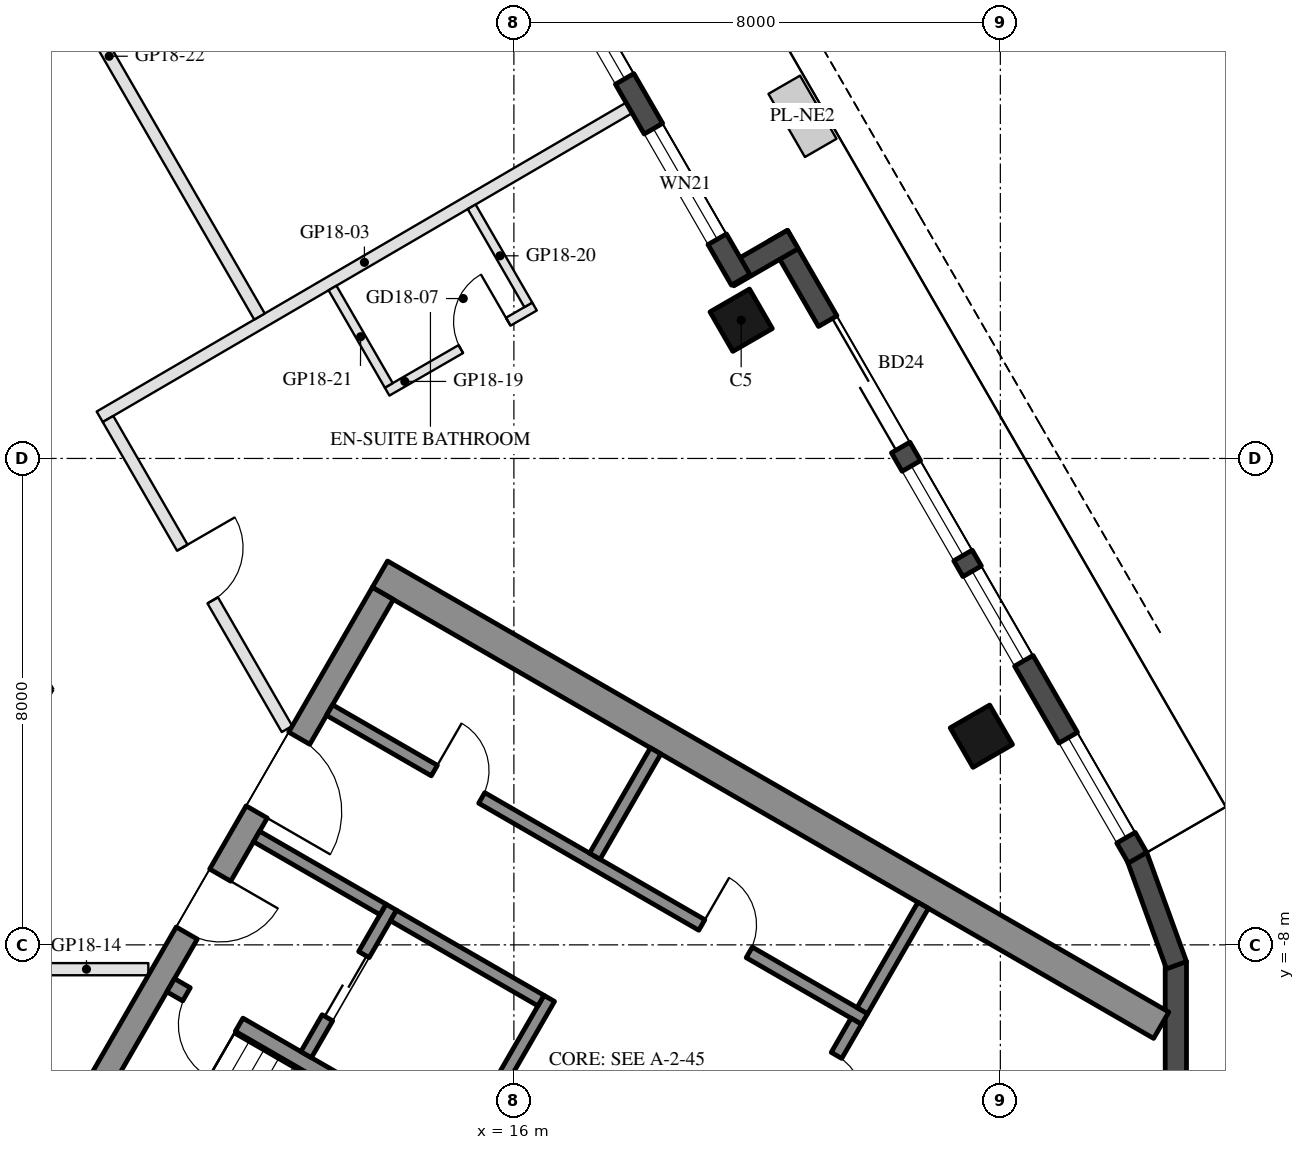
"""IFC4 building model, lengths in metres.
Left out: names, types, materials, properties, quantities, classifications, styles, units other than length and angle.
Written with IfcOpenShell. Run it as: python <this file> out.ifc"""

import sys

from ifc_helpers import new_model, si_unit, direction, frame, frame_2d, origin, origin_2d, place, context, subcontext, project, spatial, rectangle, hollow_rectangle, extrude, element, fill, save


model = new_model("IFC4")
c1 = context("Model", 3, precision=1e-05, world=origin(), true_north=direction((0.0, 1.0)))
c2 = subcontext(c1, "Body", "Model", "MODEL_VIEW")
j1 = project(units=[si_unit("LENGTHUNIT", "METRE"), si_unit("PLANEANGLEUNIT", "RADIAN")], contexts=[c1])
p1 = place(None, origin())
s1 = spatial("IfcSite", under=j1, at=p1, CompositionType="ELEMENT")
p2 = place(p1, origin())
s2 = spatial("IfcBuilding", under=s1, at=p2, CompositionType="ELEMENT")
p3 = place(p2, frame((0.0, 0.0, 198.4)))
s3 = spatial("IfcBuildingStorey", under=s2, at=p3, CompositionType="ELEMENT", Elevation=198.4)
for number, where, z_axis, x_axis in (
    (1, (23.688, -4.568, 0.0), (0.0, 0.0, 1.0), (-0.5, 0.866, 0.0)),
    (2, (19.738, 2.273, 0.0), (0.0, 0.0, 1.0), (-0.5, 0.866, 0.0)),
):
    element("IfcColumn", number, at=place(p3, frame(where, z_axis=z_axis, x_axis=x_axis)), inside=s3, PredefinedType="COLUMN", context=c2, shape_type="SweptSolid", body=[
        extrude(hollow_rectangle(XDim=0.75, YDim=0.75, WallThickness=0.035, at=origin_2d()), origin(), (0.0, 0.0, 1.0), 3.7),
    ])
for number, where, z_axis, x_axis in (
    (3, (26.244, -11.92, 0.0), (0.0, 0.0, 1.0), (0.342, 0.94, 0.0)),
    (4, (26.886, -10.185, 0.0), (0.0, 0.0, 1.0), (0.0, 1.0, 0.0)),
    (5, (26.897, -8.335, 0.0), (0.0, 0.0, 1.0), (-0.342, 0.94, 0.0)),
):
    element("IfcWall", number, at=place(p3, frame(where, z_axis=z_axis, x_axis=x_axis)), inside=s3, PredefinedType="SOLIDWALL", context=c2, shape_type="SweptSolid", body=[
        extrude(rectangle(XDim=1.91, YDim=0.35, at=frame_2d((0.955, 0.0))), origin(), (0.0, 0.0, 1.0), 3.55),
    ])
p4 = place(p3, frame((26.257, -6.567, 0.0), z_axis=(0.0, 0.0, 1.0), x_axis=(-0.500023526245, 0.866011820475, 0.0)))
e6 = element("IfcWall", 6, at=p4, inside=s3, PredefinedType="SOLIDWALL", context=c2, shape_type="SweptSolid", body=[
    extrude(rectangle(XDim=11.816, YDim=0.35, at=frame_2d((5.908, 0.0))), origin(), (0.0, 0.0, 1.0), 3.55),
])
p5 = place(p4, frame((0.38, 0.0, 0.3)))
e7 = element("IfcOpeningElement", 7, at=p5, cuts=e6, PredefinedType="OPENING", context=c2, shape_type="SweptSolid", body=[
    extrude(rectangle(XDim=1.9, YDim=2.65, at=frame_2d((0.95, 1.325))), frame((0.0, 0.185, 0.0), z_axis=(0.0, -1.0, 0.0), x_axis=(1.0, 0.0, 0.0)), (0.0, 0.0, 1.0), 0.37),
])
p6 = place(p4, frame((7.791, 0.0, 0.0)))
e8 = element("IfcOpeningElement", 8, at=p6, cuts=e6, PredefinedType="OPENING", context=c2, shape_type="SweptSolid", body=[
    extrude(rectangle(XDim=2.4, YDim=2.4, at=frame_2d((1.2, 1.2))), frame((0.0, 0.185, 0.0), z_axis=(0.0, -1.0, 0.0), x_axis=(1.0, 0.0, 0.0)), (0.0, 0.0, 1.0), 0.37),
])
p7 = place(p4, frame((3.741, 0.0, 0.3)))
e9 = element("IfcOpeningElement", 9, at=p7, cuts=e6, PredefinedType="OPENING", context=c2, shape_type="SweptSolid", body=[
    extrude(rectangle(XDim=1.7, YDim=2.65, at=frame_2d((0.85, 1.325))), frame((0.0, 0.185, 0.0), z_axis=(0.0, -1.0, 0.0), x_axis=(1.0, 0.0, 0.0)), (0.0, 0.0, 1.0), 0.37),
])
p8 = place(p4, frame((5.741, 0.0, 0.3)))
e10 = element("IfcOpeningElement", 10, at=p8, cuts=e6, PredefinedType="OPENING", context=c2, shape_type="SweptSolid", body=[
    extrude(rectangle(XDim=1.7, YDim=2.65, at=frame_2d((0.85, 1.325))), frame((0.0, 0.185, 0.0), z_axis=(0.0, -1.0, 0.0), x_axis=(1.0, 0.0, 0.0)), (0.0, 0.0, 1.0), 0.37),
])
p9 = place(p3, frame((20.588, 3.601, 0.0), z_axis=(0.0, 0.0, 1.0), x_axis=(-0.866005645448, -0.500034220881, 0.0)))
e11 = element("IfcWall", 11, at=p9, inside=s3, PredefinedType="SOLIDWALL", context=c2, shape_type="SweptSolid", body=[
    extrude(rectangle(XDim=1.22, YDim=0.35, at=frame_2d((0.61, 0.0))), origin(), (0.0, 0.0, 1.0), 3.55),
])
p10 = place(p3, frame((19.729, 2.938, 0.0), z_axis=(0.0, 0.0, 1.0), x_axis=(-0.499976430342, 0.866039011305, 0.0)))
e12 = element("IfcWall", 12, at=p10, inside=s3, PredefinedType="SOLIDWALL", context=c2, shape_type="SweptSolid", body=[
    extrude(rectangle(XDim=6.74, YDim=0.35, at=frame_2d((3.37, 0.0))), origin(), (0.0, 0.0, 1.0), 3.55),
])
p11 = place(p10, frame((0.77, 0.0, 0.3)))
e13 = element("IfcOpeningElement", 13, at=p11, cuts=e12, PredefinedType="OPENING", context=c2, shape_type="SweptSolid", body=[
    extrude(rectangle(XDim=2.1, YDim=2.65, at=frame_2d((1.05, 1.325))), frame((0.0, 0.185, 0.0), z_axis=(0.0, -1.0, 0.0), x_axis=(1.0, 0.0, 0.0)), (0.0, 0.0, 1.0), 0.37),
])
p12 = place(p10, frame((3.815, 0.0, 0.3)))
e14 = element("IfcOpeningElement", 14, at=p12, cuts=e12, PredefinedType="OPENING", context=c2, shape_type="SweptSolid", body=[
    extrude(rectangle(XDim=2.1, YDim=2.65, at=frame_2d((1.05, 1.325))), frame((0.0, 0.185, 0.0), z_axis=(0.0, -1.0, 0.0), x_axis=(1.0, 0.0, 0.0)), (0.0, 0.0, 1.0), 0.37),
])
p13 = place(p3, frame((13.797, -1.903, 0.0), z_axis=(0.0, 0.0, 1.0), x_axis=(0.866025009528, -0.500000682871, 0.0)))
e15 = element("IfcWall", 15, at=p13, inside=s3, PredefinedType="SHEAR", context=c2, shape_type="SweptSolid", body=[
    extrude(rectangle(XDim=14.837, YDim=0.5, at=frame_2d((7.418, 0.0))), origin(), (0.0, 0.0, 1.0), 3.5),
])
p14 = place(p3, frame((8.845, -10.88, 0.0), z_axis=(0.0, 0.0, 1.0), x_axis=(0.500004234368, 0.866022959057, 0.0)))
e16 = element("IfcWall", 16, at=p14, inside=s3, PredefinedType="SHEAR", context=c2, shape_type="SweptSolid", body=[
    extrude(rectangle(XDim=10.0, YDim=0.4, at=frame_2d((5.0, 0.0))), origin(), (0.0, 0.0, 1.0), 3.5),
])
p15 = place(p14, frame((3.55, 0.0, 0.0)))
e17 = element("IfcOpeningElement", 17, at=p15, cuts=e16, PredefinedType="OPENING", context=c2, shape_type="SweptSolid", body=[
    extrude(rectangle(XDim=1.1, YDim=2.1, at=frame_2d((0.55, 1.05))), frame((0.0, 0.21, 0.0), z_axis=(0.0, -1.0, 0.0), x_axis=(1.0, 0.0, 0.0)), (0.0, 0.0, 1.0), 0.42),
])
p16 = place(p14, frame((5.85, 0.0, 0.0)))
e18 = element("IfcOpeningElement", 18, at=p16, cuts=e16, PredefinedType="OPENING", context=c2, shape_type="SweptSolid", body=[
    extrude(rectangle(XDim=1.4, YDim=2.1, at=frame_2d((0.7, 1.05))), frame((0.0, 0.21, 0.0), z_axis=(0.0, -1.0, 0.0), x_axis=(1.0, 0.0, 0.0)), (0.0, 0.0, 1.0), 0.42),
])
p17 = place(p3, frame((10.356, -8.664, 0.0), z_axis=(0.0, 0.0, 1.0), x_axis=(0.866028629588, -0.499994412703, 0.0)))
e19 = element("IfcWall", 19, at=p17, inside=s3, PredefinedType="SHEAR", context=c2, shape_type="SweptSolid", body=[
    extrude(rectangle(XDim=6.45, YDim=0.25, at=frame_2d((3.225, 0.0))), origin(), (0.0, 0.0, 1.0), 3.5),
])
p18 = place(p17, frame((0.3, 0.0, 0.0)))
e20 = element("IfcOpeningElement", 20, at=p18, cuts=e19, PredefinedType="OPENING", context=c2, shape_type="SweptSolid", body=[
    extrude(rectangle(XDim=1.0, YDim=2.1, at=frame_2d((0.5, 1.05))), frame((0.0, 0.135, 0.0), z_axis=(0.0, -1.0, 0.0), x_axis=(1.0, 0.0, 0.0)), (0.0, 0.0, 1.0), 0.27),
])
p19 = place(p3, frame((15.181, -11.305, 0.0), z_axis=(0.0, 0.0, 1.0), x_axis=(0.49994636267, 0.866056369097, 0.0)))
e21 = element("IfcWall", 21, at=p19, inside=s3, PredefinedType="SHEAR", context=c2, shape_type="SweptSolid", body=[
    extrude(rectangle(XDim=2.8, YDim=0.2, at=frame_2d((1.4, 0.0))), origin(), (0.0, 0.0, 1.0), 3.5),
])
p20 = place(p3, frame((12.583, -9.805, 0.0), z_axis=(0.0, 0.0, 1.0), x_axis=(0.49994636267, 0.866056369097, 0.0)))
e22 = element("IfcWall", 22, at=p20, inside=s3, PredefinedType="SHEAR", context=c2, shape_type="SweptSolid", body=[
    extrude(rectangle(XDim=2.8, YDim=0.2, at=frame_2d((1.4, 0.0))), origin(), (0.0, 0.0, 1.0), 3.5),
])
p21 = place(p20, frame((0.7, 0.0, 0.0)))
e23 = element("IfcOpeningElement", 23, at=p21, cuts=e22, PredefinedType="OPENING", context=c2, shape_type="SweptSolid", body=[
    extrude(rectangle(XDim=1.2, YDim=2.1, at=frame_2d((0.6, 1.05))), frame((0.0, 0.11, 0.0), z_axis=(0.0, -1.0, 0.0), x_axis=(1.0, 0.0, 0.0)), (0.0, 0.0, 1.0), 0.22),
])
p22 = place(p3, frame((11.768, -6.217, 0.0), z_axis=(0.0, 0.0, 1.0), x_axis=(0.866050077142, -0.499957262057, 0.0)))
e24 = element("IfcWall", 24, at=p22, inside=s3, PredefinedType="SHEAR", context=c2, shape_type="SweptSolid", body=[
    extrude(rectangle(XDim=2.4, YDim=0.2, at=frame_2d((1.2, 0.0))), origin(), (0.0, 0.0, 1.0), 3.5),
])
p23 = place(p3, frame((14.02, -7.517, 0.0), z_axis=(0.0, 0.0, 1.0), x_axis=(0.866034573852, -0.49998411664, 0.0)))
e25 = element("IfcWall", 25, at=p23, inside=s3, PredefinedType="SHEAR", context=c2, shape_type="SweptSolid", body=[
    extrude(rectangle(XDim=2.8, YDim=0.2, at=frame_2d((1.4, 0.0))), origin(), (0.0, 0.0, 1.0), 3.5),
])
p24 = place(p3, frame((12.968, -4.138, 0.0), z_axis=(0.0, 0.0, 1.0), x_axis=(0.866028328073, -0.49999493495, 0.0)))
e26 = element("IfcWall", 26, at=p24, inside=s3, PredefinedType="SHEAR", context=c2, shape_type="SweptSolid", body=[
    extrude(rectangle(XDim=10.16, YDim=0.2, at=frame_2d((5.08, 0.0))), origin(), (0.0, 0.0, 1.0), 3.5),
])
p25 = place(p24, frame((1.99, 0.0, 0.0)))
e27 = element("IfcOpeningElement", 27, at=p25, cuts=e26, PredefinedType="OPENING", context=c2, shape_type="SweptSolid", body=[
    extrude(rectangle(XDim=0.9, YDim=2.1, at=frame_2d((0.45, 1.05))), frame((0.0, 0.11, 0.0), z_axis=(0.0, -1.0, 0.0), x_axis=(1.0, 0.0, 0.0)), (0.0, 0.0, 1.0), 0.22),
])
p26 = place(p24, frame((7.07, 0.0, 0.0)))
e28 = element("IfcOpeningElement", 28, at=p26, cuts=e26, PredefinedType="OPENING", context=c2, shape_type="SweptSolid", body=[
    extrude(rectangle(XDim=0.9, YDim=2.1, at=frame_2d((0.45, 1.05))), frame((0.0, 0.11, 0.0), z_axis=(0.0, -1.0, 0.0), x_axis=(1.0, 0.0, 0.0)), (0.0, 0.0, 1.0), 0.22),
])
p27 = place(p3, frame((20.43, -11.333, 0.0), z_axis=(0.0, 0.0, 1.0), x_axis=(0.500001309137, 0.866024647952, 0.0)))
e29 = element("IfcWall", 29, at=p27, inside=s3, PredefinedType="SHEAR", context=c2, shape_type="SweptSolid", body=[
    extrude(rectangle(XDim=2.4, YDim=0.2, at=frame_2d((1.2, 0.0))), origin(), (0.0, 0.0, 1.0), 3.5),
])
p28 = place(p27, frame((0.85, 0.0, 0.0)))
e30 = element("IfcOpeningElement", 30, at=p28, cuts=e29, PredefinedType="OPENING", context=c2, shape_type="SweptSolid", body=[
    extrude(rectangle(XDim=0.9, YDim=2.1, at=frame_2d((0.45, 1.05))), frame((0.0, 0.11, 0.0), z_axis=(0.0, -1.0, 0.0), x_axis=(1.0, 0.0, 0.0)), (0.0, 0.0, 1.0), 0.22),
])
for number, where, z_axis, x_axis in (
    (31, (17.331, -6.542, 0.0), (0.0, 0.0, 1.0), (0.5, 0.866, 0.0)),
    (32, (21.73, -9.082, 0.0), (0.0, 0.0, 1.0), (0.5, 0.866, 0.0)),
):
    element("IfcWall", number, at=place(p3, frame(where, z_axis=z_axis, x_axis=x_axis)), inside=s3, PredefinedType="SHEAR", context=c2, shape_type="SweptSolid", body=[
        extrude(rectangle(XDim=2.0, YDim=0.2, at=frame_2d((1.0, 0.0))), origin(), (0.0, 0.0, 1.0), 3.5),
    ])
p29 = place(p3, frame((17.895, 5.766, 0.0), z_axis=(0.0, 0.0, 1.0), x_axis=(-0.863697195261, -0.504011066246, 0.0)))
e33 = element("IfcWall", 33, at=p29, inside=s3, PredefinedType="PARTITIONING", context=c2, shape_type="SweptSolid", body=[
    extrude(rectangle(XDim=10.08, YDim=0.2, at=frame_2d((5.04, 0.0))), origin(), (0.0, 0.0, 1.0), 2.95),
])
p30 = place(p3, frame((9.988, -8.4, 0.0), z_axis=(0.0, 0.0, 1.0), x_axis=(-1.0, 0.0, 0.0)))
e34 = element("IfcWall", 34, at=p30, inside=s3, PredefinedType="PARTITIONING", context=c2, shape_type="SweptSolid", body=[
    extrude(rectangle(XDim=5.088, YDim=0.2, at=frame_2d((2.544, 0.0))), origin(), (0.0, 0.0, 1.0), 2.95),
])
p31 = place(p30, frame((2.044, 0.0, 0.0)))
e35 = element("IfcOpeningElement", 35, at=p31, cuts=e34, PredefinedType="OPENING", context=c2, shape_type="SweptSolid", body=[
    extrude(rectangle(XDim=1.0, YDim=2.1, at=frame_2d((0.5, 1.05))), frame((0.0, 0.11, 0.0), z_axis=(0.0, -1.0, 0.0), x_axis=(1.0, 0.0, 0.0)), (0.0, 0.0, 1.0), 0.22),
])
p32 = place(p3, frame((9.325, 0.649, 0.0), z_axis=(0.0, 0.0, 1.0), x_axis=(0.500032331163, -0.866006736574, 0.0)))
e36 = element("IfcWall", 36, at=p32, inside=s3, PredefinedType="PARTITIONING", context=c2, shape_type="SweptSolid", body=[
    extrude(rectangle(XDim=5.888, YDim=0.2, at=frame_2d((2.944, 0.0))), origin(), (0.0, 0.0, 1.0), 2.95),
])
p33 = place(p32, frame((2.444, 0.0, 0.0)))
e37 = element("IfcOpeningElement", 37, at=p33, cuts=e36, PredefinedType="OPENING", context=c2, shape_type="SweptSolid", body=[
    extrude(rectangle(XDim=1.0, YDim=2.1, at=frame_2d((0.5, 1.05))), frame((0.0, 0.11, 0.0), z_axis=(0.0, -1.0, 0.0), x_axis=(1.0, 0.0, 0.0)), (0.0, 0.0, 1.0), 0.22),
])
p34 = place(p3, frame((13.915, 1.099, 0.0), z_axis=(0.0, 0.0, 1.0), x_axis=(0.866018616679, 0.500011755427, 0.0)))
e38 = element("IfcWall", 38, at=p34, inside=s3, PredefinedType="PARTITIONING", context=c2, shape_type="SweptSolid", body=[
    extrude(rectangle(XDim=2.8, YDim=0.15, at=frame_2d((1.4, 0.0))), origin(), (0.0, 0.0, 1.0), 3.55),
])
p35 = place(p34, frame((1.4, 0.0, 0.0)))
e39 = element("IfcOpeningElement", 39, at=p35, cuts=e38, PredefinedType="OPENING", context=c2, shape_type="SweptSolid", body=[
    extrude(rectangle(XDim=0.9, YDim=2.1, at=frame_2d((0.45, 1.05))), frame((0.0, 0.085, 0.0), z_axis=(0.0, -1.0, 0.0), x_axis=(1.0, 0.0, 0.0)), (0.0, 0.0, 1.0), 0.17),
])
p36 = place(p3, frame((16.237, 2.526, 0.0), z_axis=(0.0, 0.0, 1.0), x_axis=(-0.500043919151, 0.866000045566, 0.0)))
e40 = element("IfcWall", 40, at=p36, inside=s3, PredefinedType="PARTITIONING", context=c2, shape_type="SweptSolid", body=[
    extrude(rectangle(XDim=1.863, YDim=0.15, at=frame_2d((0.931, 0.0))), origin(), (0.0, 0.0, 1.0), 3.55),
])
p37 = place(p3, frame((13.942, 1.201, 0.0), z_axis=(0.0, 0.0, 1.0), x_axis=(-0.500026996568, 0.866009816748, 0.0)))
e41 = element("IfcWall", 41, at=p37, inside=s3, PredefinedType="PARTITIONING", context=c2, shape_type="SweptSolid", body=[
    extrude(rectangle(XDim=1.851, YDim=0.15, at=frame_2d((0.925, 0.0))), origin(), (0.0, 0.0, 1.0), 3.55),
])
p38 = place(p3, frame((6.873, 10.896, 0.0), z_axis=(0.0, 0.0, 1.0), x_axis=(0.499987518031, -0.866032610133, 0.0)))
e42 = element("IfcWall", 42, at=p38, inside=s3, PredefinedType="PARTITIONING", context=c2, shape_type="SweptSolid", body=[
    extrude(rectangle(XDim=9.886, YDim=0.2, at=frame_2d((4.943, 0.0))), origin(), (0.0, 0.0, 1.0), 2.95),
])
p39 = place(p38, frame((2.45, 0.0, 0.0)))
e43 = element("IfcOpeningElement", 43, at=p39, cuts=e42, PredefinedType="OPENING", context=c2, shape_type="SweptSolid", body=[
    extrude(rectangle(XDim=1.0, YDim=2.1, at=frame_2d((0.5, 1.05))), frame((0.0, 0.11, 0.0), z_axis=(0.0, -1.0, 0.0), x_axis=(1.0, 0.0, 0.0)), (0.0, 0.0, 1.0), 0.22),
])
p40 = place(p5, origin())
e44 = element("IfcWindow", 44, at=p40, inside=s3, PartitioningType="SINGLE_PANEL", PredefinedType="WINDOW", context=c2, shape_type="SweptSolid", body=[
    extrude(rectangle(XDim=1.9, YDim=2.65, at=frame_2d((0.95, 1.325))), frame((0.0, 0.03, 0.0), z_axis=(0.0, -1.0, 0.0), x_axis=(1.0, 0.0, 0.0)), (0.0, 0.0, 1.0), 0.06),
])
fill(e7, e44)
p41 = place(p6, frame((2.4, 0.0, 0.0), z_axis=(0.0, 0.0, 1.0), x_axis=(-1.0, 0.0, 0.0)))
e45 = element("IfcDoor", 45, at=p41, inside=s3, OperationType="SLIDING_TO_LEFT", PredefinedType="DOOR", context=c2, shape_type="SweptSolid", body=[
    extrude(rectangle(XDim=2.4, YDim=2.4, at=frame_2d((1.2, 1.2))), frame((0.0, 0.025, 0.0), z_axis=(0.0, -1.0, 0.0), x_axis=(1.0, 0.0, 0.0)), (0.0, 0.0, 1.0), 0.05),
])
fill(e8, e45)
p42 = place(p7, origin())
e46 = element("IfcWindow", 46, at=p42, inside=s3, PartitioningType="SINGLE_PANEL", PredefinedType="WINDOW", context=c2, shape_type="SweptSolid", body=[
    extrude(rectangle(XDim=1.7, YDim=2.65, at=frame_2d((0.85, 1.325))), frame((0.0, 0.03, 0.0), z_axis=(0.0, -1.0, 0.0), x_axis=(1.0, 0.0, 0.0)), (0.0, 0.0, 1.0), 0.06),
])
fill(e9, e46)
p43 = place(p8, origin())
e47 = element("IfcWindow", 47, at=p43, inside=s3, PartitioningType="SINGLE_PANEL", PredefinedType="WINDOW", context=c2, shape_type="SweptSolid", body=[
    extrude(rectangle(XDim=1.7, YDim=2.65, at=frame_2d((0.85, 1.325))), frame((0.0, 0.03, 0.0), z_axis=(0.0, -1.0, 0.0), x_axis=(1.0, 0.0, 0.0)), (0.0, 0.0, 1.0), 0.06),
])
fill(e10, e47)
p44 = place(p11, origin())
e48 = element("IfcWindow", 48, at=p44, inside=s3, PartitioningType="SINGLE_PANEL", PredefinedType="WINDOW", context=c2, shape_type="SweptSolid", body=[
    extrude(rectangle(XDim=2.1, YDim=2.65, at=frame_2d((1.05, 1.325))), frame((0.0, 0.03, 0.0), z_axis=(0.0, -1.0, 0.0), x_axis=(1.0, 0.0, 0.0)), (0.0, 0.0, 1.0), 0.06),
])
fill(e13, e48)
p45 = place(p12, origin())
e49 = element("IfcWindow", 49, at=p45, inside=s3, PartitioningType="SINGLE_PANEL", PredefinedType="WINDOW", context=c2, shape_type="SweptSolid", body=[
    extrude(rectangle(XDim=2.1, YDim=2.65, at=frame_2d((1.05, 1.325))), frame((0.0, 0.03, 0.0), z_axis=(0.0, -1.0, 0.0), x_axis=(1.0, 0.0, 0.0)), (0.0, 0.0, 1.0), 0.06),
])
fill(e14, e49)
p46 = place(p21, origin())
e50 = element("IfcDoor", 50, at=p46, inside=s3, OperationType="DOUBLE_DOOR_SLIDING", PredefinedType="DOOR", context=c2, shape_type="SweptSolid", body=[
    extrude(rectangle(XDim=1.2, YDim=2.1, at=frame_2d((0.6, 1.05))), frame((0.0, 0.025, 0.0), z_axis=(0.0, -1.0, 0.0), x_axis=(1.0, 0.0, 0.0)), (0.0, 0.0, 1.0), 0.05),
])
fill(e23, e50)
p47 = place(p25, origin())
e51 = element("IfcDoor", 51, at=p47, inside=s3, OperationType="SINGLE_SWING_LEFT", PredefinedType="DOOR", context=c2, shape_type="SweptSolid", body=[
    extrude(rectangle(XDim=0.9, YDim=2.1, at=frame_2d((0.45, 1.05))), frame((0.0, 0.025, 0.0), z_axis=(0.0, -1.0, 0.0), x_axis=(1.0, 0.0, 0.0)), (0.0, 0.0, 1.0), 0.05),
])
fill(e27, e51)
p48 = place(p26, origin())
e52 = element("IfcDoor", 52, at=p48, inside=s3, OperationType="SINGLE_SWING_LEFT", PredefinedType="DOOR", context=c2, shape_type="SweptSolid", body=[
    extrude(rectangle(XDim=0.9, YDim=2.1, at=frame_2d((0.45, 1.05))), frame((0.0, 0.025, 0.0), z_axis=(0.0, -1.0, 0.0), x_axis=(1.0, 0.0, 0.0)), (0.0, 0.0, 1.0), 0.05),
])
fill(e28, e52)
p49 = place(p28, frame((0.9, 0.0, 0.0), z_axis=(0.0, 0.0, 1.0), x_axis=(-1.0, 0.0, 0.0)))
e53 = element("IfcDoor", 53, at=p49, inside=s3, OperationType="SINGLE_SWING_RIGHT", PredefinedType="DOOR", context=c2, shape_type="SweptSolid", body=[
    extrude(rectangle(XDim=0.9, YDim=2.1, at=frame_2d((0.45, 1.05))), frame((0.0, 0.025, 0.0), z_axis=(0.0, -1.0, 0.0), x_axis=(1.0, 0.0, 0.0)), (0.0, 0.0, 1.0), 0.05),
])
fill(e30, e53)
p50 = place(p15, frame((1.1, 0.0, 0.0), z_axis=(0.0, 0.0, 1.0), x_axis=(-1.0, 0.0, 0.0)))
e54 = element("IfcDoor", 54, at=p50, inside=s3, OperationType="SINGLE_SWING_LEFT", PredefinedType="DOOR", context=c2, shape_type="SweptSolid", body=[
    extrude(rectangle(XDim=1.1, YDim=2.1, at=frame_2d((0.55, 1.05))), frame((0.0, 0.025, 0.0), z_axis=(0.0, -1.0, 0.0), x_axis=(1.0, 0.0, 0.0)), (0.0, 0.0, 1.0), 0.05),
])
fill(e17, e54)
p51 = place(p16, frame((1.4, 0.0, 0.0), z_axis=(0.0, 0.0, 1.0), x_axis=(-1.0, 0.0, 0.0)))
e55 = element("IfcDoor", 55, at=p51, inside=s3, OperationType="DOUBLE_DOOR_SINGLE_SWING", PredefinedType="DOOR", context=c2, shape_type="SweptSolid", body=[
    extrude(rectangle(XDim=1.4, YDim=2.1, at=frame_2d((0.7, 1.05))), frame((0.0, 0.025, 0.0), z_axis=(0.0, -1.0, 0.0), x_axis=(1.0, 0.0, 0.0)), (0.0, 0.0, 1.0), 0.05),
])
fill(e18, e55)
p52 = place(p18, frame((1.0, 0.0, 0.0), z_axis=(0.0, 0.0, 1.0), x_axis=(-1.0, 0.0, 0.0)))
e56 = element("IfcDoor", 56, at=p52, inside=s3, OperationType="SINGLE_SWING_LEFT", PredefinedType="DOOR", context=c2, shape_type="SweptSolid", body=[
    extrude(rectangle(XDim=1.0, YDim=2.1, at=frame_2d((0.5, 1.05))), frame((0.0, 0.025, 0.0), z_axis=(0.0, -1.0, 0.0), x_axis=(1.0, 0.0, 0.0)), (0.0, 0.0, 1.0), 0.05),
])
fill(e20, e56)
p53 = place(p35, origin())
e57 = element("IfcDoor", 57, at=p53, inside=s3, OperationType="SINGLE_SWING_RIGHT", PredefinedType="DOOR", context=c2, shape_type="SweptSolid", body=[
    extrude(rectangle(XDim=0.9, YDim=2.1, at=frame_2d((0.45, 1.05))), frame((0.0, 0.025, 0.0), z_axis=(0.0, -1.0, 0.0), x_axis=(1.0, 0.0, 0.0)), (0.0, 0.0, 1.0), 0.05),
])
fill(e39, e57)
p54 = place(p33, origin())
e58 = element("IfcDoor", 58, at=p54, inside=s3, OperationType="SINGLE_SWING_LEFT", PredefinedType="DOOR", context=c2, shape_type="SweptSolid", body=[
    extrude(rectangle(XDim=1.0, YDim=2.1, at=frame_2d((0.5, 1.05))), frame((0.0, 0.025, 0.0), z_axis=(0.0, -1.0, 0.0), x_axis=(1.0, 0.0, 0.0)), (0.0, 0.0, 1.0), 0.05),
])
fill(e37, e58)
save(model, sys.argv[1])
